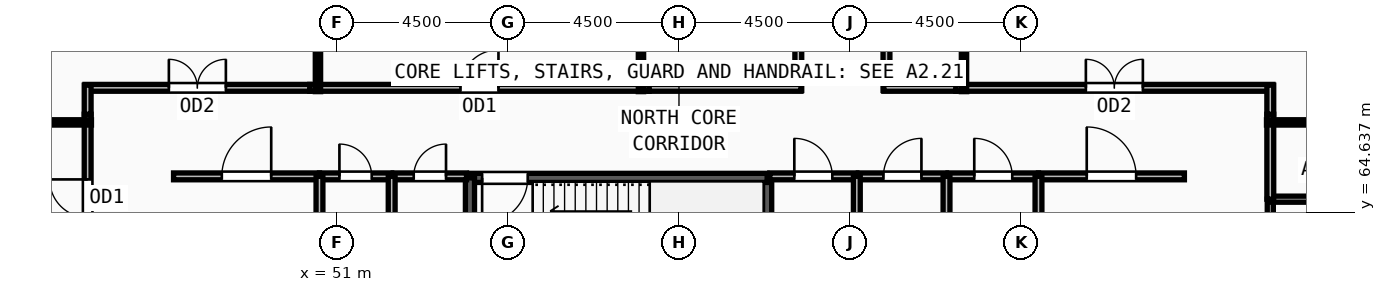
"""IFC4 building model, lengths in metres.
Left out: names, types, materials, properties, quantities, classifications, styles, units other than length and angle.
Written with IfcOpenShell. Run it as: python <this file> out.ifc"""

import sys

from ifc_helpers import new_model, si_unit, direction, frame, frame_2d, origin, place, context, subcontext, project, spatial, rectangle, extrude, source, transform, mapped, element, fill, save


model = new_model("IFC4")
c1 = context("Model", 3, precision=1e-05, world=origin(), true_north=direction((0.0, 1.0)))
c2 = subcontext(c1, "Body", "Model", "MODEL_VIEW")
j1 = project(units=[si_unit("LENGTHUNIT", "METRE"), si_unit("PLANEANGLEUNIT", "RADIAN")], contexts=[c1])
p1 = place(None, origin())
s1 = spatial("IfcSite", under=j1, at=p1, CompositionType="ELEMENT")
p2 = place(p1, origin())
s2 = spatial("IfcBuilding", under=s1, at=p2, CompositionType="ELEMENT")
p3 = place(p2, frame((0.0, 0.0, 247.5)))
s3 = spatial("IfcBuildingStorey", under=s2, at=p3, CompositionType="ELEMENT", Elevation=247.5)
p4 = place(p3, frame((62.32, 62.1, 0.0), z_axis=(0.0, 0.0, 1.0), x_axis=(0.0, 1.0, 0.0)))
e1 = element("IfcWall", 1, at=p4, inside=s3, PredefinedType="SOLIDWALL", context=c2, shape_type="SweptSolid", body=[
    extrude(rectangle(XDim=3.44, YDim=0.24, at=frame_2d((1.72, 0.0))), origin(), (0.0, 0.0, 1.0), 3.57),
])
p5 = place(p3, frame((62.32, 65.54, 0.0), z_axis=(0.0, 0.0, 1.0), x_axis=(-1.0, 0.0, 0.0)))
e2 = element("IfcWall", 2, at=p5, inside=s3, PredefinedType="SOLIDWALL", context=c2, shape_type="SweptSolid", body=[
    extrude(rectangle(XDim=7.82, YDim=0.24, at=frame_2d((3.91, 0.0))), origin(), (0.0, 0.0, 1.0), 3.57),
])
m1 = source(origin(), c2, "Body", "SweptSolid", [
    extrude(rectangle(XDim=1.2, YDim=2.2, at=frame_2d((0.6, 1.1))), frame((0.0, 0.13, 0.0), z_axis=(0.0, -1.0, 0.0), x_axis=(1.0, 0.0, 0.0)), (0.0, 0.0, 1.0), 0.26),
])
p6 = place(p5, frame((6.3, 0.0, 0.0)))
e3 = element("IfcOpeningElement", 3, at=p6, cuts=e2, PredefinedType="OPENING", context=c2, shape_type="MappedRepresentation", body=[
    mapped(m1, transform((0.0, 0.0, 0.0), x_axis=(1.0, 0.0, 0.0), y_axis=(0.0, 1.0, 0.0), z_axis=(0.0, 0.0, 1.0), scale=1.0)),
])
p7 = place(p3, frame((54.5, 65.54, 0.0), z_axis=(0.0, 0.0, 1.0), x_axis=(0.0, -1.0, 0.0)))
e4 = element("IfcWall", 4, at=p7, inside=s3, PredefinedType="SOLIDWALL", context=c2, shape_type="SweptSolid", body=[
    extrude(rectangle(XDim=3.44, YDim=0.24, at=frame_2d((1.72, 0.0))), origin(), (0.0, 0.0, 1.0), 3.57),
])
p8 = place(p3, frame((75.56, 62.24, 0.0), z_axis=(0.0, 0.0, 1.0), x_axis=(0.0, 1.0, 0.0)))
e5 = element("IfcWall", 5, at=p8, inside=s3, PredefinedType="PARTITIONING", context=c2, shape_type="SweptSolid", body=[
    extrude(rectangle(XDim=2.74, YDim=0.16, at=frame_2d((1.37, 0.0))), origin(), (0.0, 0.0, 1.0), 3.57),
])
m2 = source(origin(), c2, "Body", "SweptSolid", [
    extrude(rectangle(XDim=1.05, YDim=2.15, at=frame_2d((0.525, 1.075))), frame((0.0, 0.09, 0.0), z_axis=(0.0, -1.0, 0.0), x_axis=(1.0, 0.0, 0.0)), (0.0, 0.0, 1.0), 0.18),
])
p9 = place(p8, frame((0.845, 0.0, 0.0)))
e6 = element("IfcOpeningElement", 6, at=p9, cuts=e5, PredefinedType="OPENING", context=c2, shape_type="MappedRepresentation", body=[
    mapped(m2, transform((0.0, 0.0, 0.0), x_axis=(1.0, 0.0, 0.0), y_axis=(0.0, 1.0, 0.0), z_axis=(0.0, 0.0, 1.0), scale=1.0)),
])
p10 = place(p3, frame((50.54, 65.58, 0.0), z_axis=(0.0, 0.0, 1.0), x_axis=(1.0, 0.0, 0.0)))
e7 = element("IfcWall", 7, at=p10, inside=s3, PredefinedType="PARTITIONING", context=c2, shape_type="SweptSolid", body=[
    extrude(rectangle(XDim=1.9, YDim=0.18, at=frame_2d((0.95, 0.0))), origin(), (0.0, 0.0, 1.0), 3.57),
])
m3 = source(origin(), c2, "Body", "SweptSolid", [
    extrude(rectangle(XDim=0.85, YDim=2.1, at=frame_2d((0.425, 1.05))), frame((0.0, 0.1, 0.0), z_axis=(0.0, -1.0, 0.0), x_axis=(1.0, 0.0, 0.0)), (0.0, 0.0, 1.0), 0.2),
])
p11 = place(p10, frame((0.525, 0.0, 0.0)))
e8 = element("IfcOpeningElement", 8, at=p11, cuts=e7, PredefinedType="OPENING", context=c2, shape_type="MappedRepresentation", body=[
    mapped(m3, transform((0.0, 0.0, 0.0), x_axis=(1.0, 0.0, 0.0), y_axis=(0.0, 1.0, 0.0), z_axis=(0.0, 0.0, 1.0), scale=1.0)),
])
p12 = place(p3, frame((52.48, 65.58, 0.0), z_axis=(0.0, 0.0, 1.0), x_axis=(1.0, 0.0, 0.0)))
e9 = element("IfcWall", 9, at=p12, inside=s3, PredefinedType="PARTITIONING", context=c2, shape_type="SweptSolid", body=[
    extrude(rectangle(XDim=1.93, YDim=0.18, at=frame_2d((0.965, 0.0))), origin(), (0.0, 0.0, 1.0), 3.57),
])
p13 = place(p12, frame((0.54, 0.0, 0.0)))
e10 = element("IfcOpeningElement", 10, at=p13, cuts=e9, PredefinedType="OPENING", context=c2, shape_type="MappedRepresentation", body=[
    mapped(m3, transform((0.0, 0.0, 0.0), x_axis=(1.0, 0.0, 0.0), y_axis=(0.0, 1.0, 0.0), z_axis=(0.0, 0.0, 1.0), scale=1.0)),
])
p14 = place(p3, frame((62.39, 65.58, 0.0), z_axis=(0.0, 0.0, 1.0), x_axis=(1.0, 0.0, 0.0)))
e11 = element("IfcWall", 11, at=p14, inside=s3, PredefinedType="PARTITIONING", context=c2, shape_type="SweptSolid", body=[
    extrude(rectangle(XDim=2.29, YDim=0.18, at=frame_2d((1.145, 0.0))), origin(), (0.0, 0.0, 1.0), 3.57),
])
m4 = source(origin(), c2, "Body", "SweptSolid", [
    extrude(rectangle(XDim=1.0, YDim=2.2, at=frame_2d((0.5, 1.1))), frame((0.0, 0.1, 0.0), z_axis=(0.0, -1.0, 0.0), x_axis=(1.0, 0.0, 0.0)), (0.0, 0.0, 1.0), 0.2),
])
p15 = place(p14, frame((0.645, 0.0, 0.0)))
e12 = element("IfcOpeningElement", 12, at=p15, cuts=e11, PredefinedType="OPENING", context=c2, shape_type="MappedRepresentation", body=[
    mapped(m4, transform((0.0, 0.0, 0.0), x_axis=(1.0, 0.0, 0.0), y_axis=(0.0, 1.0, 0.0), z_axis=(0.0, 0.0, 1.0), scale=1.0)),
])
p16 = place(p3, frame((64.72, 65.58, 0.0), z_axis=(0.0, 0.0, 1.0), x_axis=(1.0, 0.0, 0.0)))
e13 = element("IfcWall", 13, at=p16, inside=s3, PredefinedType="PARTITIONING", context=c2, shape_type="SweptSolid", body=[
    extrude(rectangle(XDim=2.32, YDim=0.18, at=frame_2d((1.16, 0.0))), origin(), (0.0, 0.0, 1.0), 3.57),
])
p17 = place(p16, frame((0.66, 0.0, 0.0)))
e14 = element("IfcOpeningElement", 14, at=p17, cuts=e13, PredefinedType="OPENING", context=c2, shape_type="MappedRepresentation", body=[
    mapped(m4, transform((0.0, 0.0, 0.0), x_axis=(1.0, 0.0, 0.0), y_axis=(0.0, 1.0, 0.0), z_axis=(0.0, 0.0, 1.0), scale=1.0)),
])
p18 = place(p3, frame((67.08, 65.58, 0.0), z_axis=(0.0, 0.0, 1.0), x_axis=(1.0, 0.0, 0.0)))
e15 = element("IfcWall", 15, at=p18, inside=s3, PredefinedType="PARTITIONING", context=c2, shape_type="SweptSolid", body=[
    extrude(rectangle(XDim=2.38, YDim=0.18, at=frame_2d((1.19, 0.0))), origin(), (0.0, 0.0, 1.0), 3.57),
])
p19 = place(p18, frame((0.69, 0.0, 0.0)))
e16 = element("IfcOpeningElement", 16, at=p19, cuts=e15, PredefinedType="OPENING", context=c2, shape_type="MappedRepresentation", body=[
    mapped(m4, transform((0.0, 0.0, 0.0), x_axis=(1.0, 0.0, 0.0), y_axis=(0.0, 1.0, 0.0), z_axis=(0.0, 0.0, 1.0), scale=1.0)),
])
p20 = place(p3, frame((46.7, 65.58, 0.0), z_axis=(0.0, 0.0, 1.0), x_axis=(1.0, 0.0, 0.0)))
e17 = element("IfcWall", 17, at=p20, inside=s3, PredefinedType="PARTITIONING", context=c2, shape_type="SweptSolid", body=[
    extrude(rectangle(XDim=3.84, YDim=0.18, at=frame_2d((1.92, 0.0))), origin(), (0.0, 0.0, 1.0), 3.57),
])
m5 = source(origin(), c2, "Body", "SweptSolid", [
    extrude(rectangle(XDim=1.3, YDim=2.2, at=frame_2d((0.65, 1.1))), frame((0.0, 0.1, 0.0), z_axis=(0.0, -1.0, 0.0), x_axis=(1.0, 0.0, 0.0)), (0.0, 0.0, 1.0), 0.2),
])
p21 = place(p20, frame((1.27, 0.0, 0.0)))
e18 = element("IfcOpeningElement", 18, at=p21, cuts=e17, PredefinedType="OPENING", context=c2, shape_type="MappedRepresentation", body=[
    mapped(m5, transform((0.0, 0.0, 0.0), x_axis=(1.0, 0.0, 0.0), y_axis=(0.0, 1.0, 0.0), z_axis=(0.0, 0.0, 1.0), scale=1.0)),
])
p22 = place(p3, frame((69.46, 65.58, 0.0), z_axis=(0.0, 0.0, 1.0), x_axis=(1.0, 0.0, 0.0)))
e19 = element("IfcWall", 19, at=p22, inside=s3, PredefinedType="PARTITIONING", context=c2, shape_type="SweptSolid", body=[
    extrude(rectangle(XDim=3.84, YDim=0.18, at=frame_2d((1.92, 0.0))), origin(), (0.0, 0.0, 1.0), 3.57),
])
p23 = place(p22, frame((1.27, 0.0, 0.0)))
e20 = element("IfcOpeningElement", 20, at=p23, cuts=e19, PredefinedType="OPENING", context=c2, shape_type="MappedRepresentation", body=[
    mapped(m5, transform((0.0, 0.0, 0.0), x_axis=(1.0, 0.0, 0.0), y_axis=(0.0, 1.0, 0.0), z_axis=(0.0, 0.0, 1.0), scale=1.0)),
])
p24 = place(p3, frame((67.285, 67.91, 0.0), z_axis=(0.0, 0.0, 1.0), x_axis=(1.0, 0.0, 0.0)))
e21 = element("IfcWall", 21, at=p24, inside=s3, PredefinedType="PARTITIONING", context=c2, shape_type="SweptSolid", body=[
    extrude(rectangle(XDim=8.345, YDim=0.18, at=frame_2d((4.172, 0.0))), origin(), (0.0, 0.0, 1.0), 3.205),
])
m6 = source(origin(), c2, "Body", "SweptSolid", [
    extrude(rectangle(XDim=1.5, YDim=2.2, at=frame_2d((0.75, 1.1))), frame((0.0, 0.1, 0.0), z_axis=(0.0, -1.0, 0.0), x_axis=(1.0, 0.0, 0.0)), (0.0, 0.0, 1.0), 0.2),
])
p25 = place(p24, frame((3.422, 0.0, 0.0)))
e22 = element("IfcOpeningElement", 22, at=p25, cuts=e21, PredefinedType="OPENING", context=c2, shape_type="MappedRepresentation", body=[
    mapped(m6, transform((0.0, 0.0, 0.0), x_axis=(1.0, 0.0, 0.0), y_axis=(0.0, 1.0, 0.0), z_axis=(0.0, 0.0, 1.0), scale=1.0)),
])
p26 = place(p3, frame((65.46, 77.681, 0.0), z_axis=(0.0, 0.0, 1.0), x_axis=(0.0, -1.0, 0.0)))
e23 = element("IfcWall", 23, at=p26, inside=s3, PredefinedType="PARTITIONING", context=c2, shape_type="SweptSolid", body=[
    extrude(rectangle(XDim=9.841, YDim=0.18, at=frame_2d((4.92, 0.0))), origin(), (0.0, 0.0, 1.0), 3.57),
])
p27 = place(p26, frame((4.42, 0.0, 0.0)))
e24 = element("IfcOpeningElement", 24, at=p27, cuts=e23, PredefinedType="OPENING", context=c2, shape_type="MappedRepresentation", body=[
    mapped(m4, transform((0.0, 0.0, 0.0), x_axis=(1.0, 0.0, 0.0), y_axis=(0.0, 1.0, 0.0), z_axis=(0.0, 0.0, 1.0), scale=1.0)),
])
p28 = place(p3, frame((63.14, 67.84, 0.0), z_axis=(0.0, 0.0, 1.0), x_axis=(0.0, 1.0, 0.0)))
e25 = element("IfcWall", 25, at=p28, inside=s3, PredefinedType="PARTITIONING", context=c2, shape_type="SweptSolid", body=[
    extrude(rectangle(XDim=10.019, YDim=0.18, at=frame_2d((5.009, 0.0))), origin(), (0.0, 0.0, 1.0), 3.57),
])
p29 = place(p28, frame((4.509, 0.0, 0.0)))
e26 = element("IfcOpeningElement", 26, at=p29, cuts=e25, PredefinedType="OPENING", context=c2, shape_type="MappedRepresentation", body=[
    mapped(m4, transform((0.0, 0.0, 0.0), x_axis=(1.0, 0.0, 0.0), y_axis=(0.0, 1.0, 0.0), z_axis=(0.0, 0.0, 1.0), scale=1.0)),
])
p30 = place(p3, frame((50.285, 67.91, 0.0), z_axis=(0.0, 0.0, 1.0), x_axis=(1.0, 0.0, 0.0)))
e27 = element("IfcWall", 27, at=p30, inside=s3, PredefinedType="PARTITIONING", context=c2, shape_type="SweptSolid", body=[
    extrude(rectangle(XDim=8.93, YDim=0.18, at=frame_2d((4.465, 0.0))), origin(), (0.0, 0.0, 1.0), 3.205),
])
p31 = place(p30, frame((3.965, 0.0, 0.0)))
e28 = element("IfcOpeningElement", 28, at=p31, cuts=e27, PredefinedType="OPENING", context=c2, shape_type="MappedRepresentation", body=[
    mapped(m4, transform((0.0, 0.0, 0.0), x_axis=(1.0, 0.0, 0.0), y_axis=(0.0, 1.0, 0.0), z_axis=(0.0, 0.0, 1.0), scale=1.0)),
])
p32 = place(p3, frame((44.37, 67.91, 0.0), z_axis=(0.0, 0.0, 1.0), x_axis=(1.0, 0.0, 0.0)))
e29 = element("IfcWall", 29, at=p32, inside=s3, PredefinedType="PARTITIONING", context=c2, shape_type="SweptSolid", body=[
    extrude(rectangle(XDim=5.915, YDim=0.18, at=frame_2d((2.958, 0.0))), origin(), (0.0, 0.0, 1.0), 3.205),
])
p33 = place(p32, frame((2.207, 0.0, 0.0)))
e30 = element("IfcOpeningElement", 30, at=p33, cuts=e29, PredefinedType="OPENING", context=c2, shape_type="MappedRepresentation", body=[
    mapped(m6, transform((0.0, 0.0, 0.0), x_axis=(1.0, 0.0, 0.0), y_axis=(0.0, 1.0, 0.0), z_axis=(0.0, 0.0, 1.0), scale=1.0)),
])
p34 = place(p3, frame((44.44, 62.785, 0.0), z_axis=(0.0, 0.0, 1.0), x_axis=(0.0, 1.0, 0.0)))
e31 = element("IfcWall", 31, at=p34, inside=s3, PredefinedType="PARTITIONING", context=c2, shape_type="SweptSolid", body=[
    extrude(rectangle(XDim=4.43, YDim=0.18, at=frame_2d((2.215, 0.0))), origin(), (0.0, 0.0, 1.0), 3.57),
])
p35 = place(p34, frame((1.715, 0.0, 0.0)))
e32 = element("IfcOpeningElement", 32, at=p35, cuts=e31, PredefinedType="OPENING", context=c2, shape_type="MappedRepresentation", body=[
    mapped(m4, transform((0.0, 0.0, 0.0), x_axis=(1.0, 0.0, 0.0), y_axis=(0.0, 1.0, 0.0), z_axis=(0.0, 0.0, 1.0), scale=1.0)),
])
p36 = place(p3, frame((75.56, 64.98, 0.0), z_axis=(0.0, 0.0, 1.0), x_axis=(1.0, 0.0, 0.0)))
e33 = element("IfcWall", 33, at=p36, inside=s3, PredefinedType="PARTITIONING", context=c2, shape_type="SweptSolid", body=[
    extrude(rectangle(XDim=4.46, YDim=0.16, at=frame_2d((2.23, 0.0))), origin(), (0.0, 0.0, 1.0), 3.57),
])
p37 = place(p3, frame((50.54, 61.95, 0.0), z_axis=(0.0, 0.0, 1.0), x_axis=(0.0, 1.0, 0.0)))
e34 = element("IfcWall", 34, at=p37, inside=s3, PredefinedType="PARTITIONING", context=c2, shape_type="SweptSolid", body=[
    extrude(rectangle(XDim=3.63, YDim=0.18, at=frame_2d((1.815, 0.0))), origin(), (0.0, 0.0, 1.0), 3.57),
])
for number, where, z_axis, x_axis in (
    (35, (52.44, 61.825, 0.0), (0.0, 0.0, 1.0), (0.0, 1.0, 0.0)),
    (36, (64.68, 61.825, 0.0), (0.0, 0.0, 1.0), (0.0, 1.0, 0.0)),
    (37, (67.04, 61.825, 0.0), (0.0, 0.0, 1.0), (0.0, 1.0, 0.0)),
):
    element("IfcWall", number, at=place(p3, frame(where, z_axis=z_axis, x_axis=x_axis)), inside=s3, PredefinedType="PARTITIONING", context=c2, shape_type="SweptSolid", body=[
        extrude(rectangle(XDim=3.755, YDim=0.18, at=frame_2d((1.877, 0.0))), origin(), (0.0, 0.0, 1.0), 3.57),
    ])
p38 = place(p3, frame((69.46, 61.95, 0.0), z_axis=(0.0, 0.0, 1.0), x_axis=(0.0, 1.0, 0.0)))
e38 = element("IfcWall", 38, at=p38, inside=s3, PredefinedType="PARTITIONING", context=c2, shape_type="SweptSolid", body=[
    extrude(rectangle(XDim=3.63, YDim=0.18, at=frame_2d((1.815, 0.0))), origin(), (0.0, 0.0, 1.0), 3.57),
])
p39 = place(p3, frame((75.56, 67.215, 0.0), z_axis=(0.0, 0.0, 1.0), x_axis=(0.0, -1.0, 0.0)))
e39 = element("IfcWall", 39, at=p39, inside=s3, PredefinedType="PARTITIONING", context=c2, shape_type="SweptSolid", body=[
    extrude(rectangle(XDim=2.235, YDim=0.18, at=frame_2d((1.118, 0.0))), origin(), (0.0, 0.0, 1.0), 3.57),
])
p40 = place(p3, frame((75.56, 67.98, 0.0), z_axis=(0.0, 0.0, 1.0), x_axis=(0.0, -1.0, 0.0)))
e40 = element("IfcWall", 40, at=p40, inside=s3, PredefinedType="PARTITIONING", context=c2, shape_type="SweptSolid", body=[
    extrude(rectangle(XDim=0.765, YDim=0.18, at=frame_2d((0.382, 0.0))), origin(), (0.0, 0.0, 1.0), 3.57),
])
p41 = place(p3, frame((65.39, 67.91, 0.0), z_axis=(0.0, 0.0, 1.0), x_axis=(1.0, 0.0, 0.0)))
e41 = element("IfcWall", 41, at=p41, inside=s3, PredefinedType="PARTITIONING", context=c2, shape_type="SweptSolid", body=[
    extrude(rectangle(XDim=1.895, YDim=0.18, at=frame_2d((0.948, 0.0))), origin(), (0.0, 0.0, 1.0), 3.57),
])
p42 = place(p3, frame((59.215, 67.91, 0.0), z_axis=(0.0, 0.0, 1.0), x_axis=(1.0, 0.0, 0.0)))
e42 = element("IfcWall", 42, at=p42, inside=s3, PredefinedType="PARTITIONING", context=c2, shape_type="SweptSolid", body=[
    extrude(rectangle(XDim=3.995, YDim=0.18, at=frame_2d((1.998, 0.0))), origin(), (0.0, 0.0, 1.0), 3.57),
])
p43 = place(p3, frame((44.44, 67.215, 0.0), z_axis=(0.0, 0.0, 1.0), x_axis=(0.0, 1.0, 0.0)))
e43 = element("IfcWall", 43, at=p43, inside=s3, PredefinedType="PARTITIONING", context=c2, shape_type="SweptSolid", body=[
    extrude(rectangle(XDim=0.765, YDim=0.18, at=frame_2d((0.382, 0.0))), origin(), (0.0, 0.0, 1.0), 3.57),
])
for number, where, z_axis, x_axis in (
    (44, (44.54, 67.0, 0.0), (0.0, 0.0, 1.0), (-1.0, 0.0, 0.0)),
    (45, (75.46, 67.0, 0.0), (0.0, 0.0, 1.0), (1.0, 0.0, 0.0)),
):
    element("IfcWall", number, at=place(p3, frame(where, z_axis=z_axis, x_axis=x_axis)), inside=s3, PredefinedType="PARTITIONING", context=c2, shape_type="SweptSolid", body=[
        extrude(rectangle(XDim=16.888, YDim=0.14, at=frame_2d((8.444, 0.0))), origin(), (0.0, 0.0, 1.0), 3.57),
    ])
p44 = place(p3, frame((50.5, 67.81, 0.0), z_axis=(0.0, 0.0, 1.0), x_axis=(0.0, 1.0, 0.0)))
e46 = element("IfcWall", 46, at=p44, inside=s3, PredefinedType="PARTITIONING", context=c2, shape_type="SweptSolid", body=[
    extrude(rectangle(XDim=9.424, YDim=0.14, at=frame_2d((4.712, 0.0))), origin(), (0.0, 0.0, 1.0), 3.57),
])
p45 = place(p3, frame((59.0, 67.81, 0.0), z_axis=(0.0, 0.0, 1.0), x_axis=(0.0, 1.0, 0.0)))
e47 = element("IfcWall", 47, at=p45, inside=s3, PredefinedType="PARTITIONING", context=c2, shape_type="SweptSolid", body=[
    extrude(rectangle(XDim=9.969, YDim=0.14, at=frame_2d((4.984, 0.0))), origin(), (0.0, 0.0, 1.0), 3.57),
])
p46 = place(p3, frame((67.5, 67.81, 0.0), z_axis=(0.0, 0.0, 1.0), x_axis=(0.0, 1.0, 0.0)))
e48 = element("IfcWall", 48, at=p46, inside=s3, PredefinedType="PARTITIONING", context=c2, shape_type="SweptSolid", body=[
    extrude(rectangle(XDim=9.805, YDim=0.14, at=frame_2d((4.902, 0.0))), origin(), (0.0, 0.0, 1.0), 3.57),
])
m7 = source(origin(), c2, "Body", "SweptSolid", [
    extrude(rectangle(XDim=1.2, YDim=2.2, at=frame_2d((0.6, 1.1))), frame((0.0, 0.025, 0.0), z_axis=(0.0, -1.0, 0.0), x_axis=(1.0, 0.0, 0.0)), (0.0, 0.0, 1.0), 0.05),
])
p47 = place(p6, origin())
e49 = element("IfcDoor", 49, at=p47, inside=s3, OperationType="SINGLE_SWING_RIGHT", PredefinedType="DOOR", context=c2, shape_type="MappedRepresentation", body=[
    mapped(m7, transform((0.0, 0.0, 0.0), x_axis=(1.0, 0.0, 0.0), y_axis=(0.0, 1.0, 0.0), z_axis=(0.0, 0.0, 1.0), scale=1.0)),
])
fill(e3, e49)
m8 = source(origin(), c2, "Body", "SweptSolid", [
    extrude(rectangle(XDim=0.85, YDim=2.1, at=frame_2d((0.425, 1.05))), frame((0.0, 0.025, 0.0), z_axis=(0.0, -1.0, 0.0), x_axis=(1.0, 0.0, 0.0)), (0.0, 0.0, 1.0), 0.05),
])
p48 = place(p11, origin())
e50 = element("IfcDoor", 50, at=p48, inside=s3, OperationType="SINGLE_SWING_LEFT", PredefinedType="DOOR", context=c2, shape_type="MappedRepresentation", body=[
    mapped(m8, transform((0.0, 0.0, 0.0), x_axis=(1.0, 0.0, 0.0), y_axis=(0.0, 1.0, 0.0), z_axis=(0.0, 0.0, 1.0), scale=1.0)),
])
fill(e8, e50)
p49 = place(p13, origin())
e51 = element("IfcDoor", 51, at=p49, inside=s3, OperationType="SINGLE_SWING_RIGHT", PredefinedType="DOOR", context=c2, shape_type="MappedRepresentation", body=[
    mapped(m8, transform((0.0, 0.0, 0.0), x_axis=(1.0, 0.0, 0.0), y_axis=(0.0, 1.0, 0.0), z_axis=(0.0, 0.0, 1.0), scale=1.0)),
])
fill(e10, e51)
m9 = source(origin(), c2, "Body", "SweptSolid", [
    extrude(rectangle(XDim=1.0, YDim=2.2, at=frame_2d((0.5, 1.1))), frame((0.0, 0.025, 0.0), z_axis=(0.0, -1.0, 0.0), x_axis=(1.0, 0.0, 0.0)), (0.0, 0.0, 1.0), 0.05),
])
p50 = place(p15, origin())
e52 = element("IfcDoor", 52, at=p50, inside=s3, OperationType="SINGLE_SWING_LEFT", PredefinedType="DOOR", context=c2, shape_type="MappedRepresentation", body=[
    mapped(m9, transform((0.0, 0.0, 0.0), x_axis=(1.0, 0.0, 0.0), y_axis=(0.0, 1.0, 0.0), z_axis=(0.0, 0.0, 1.0), scale=1.0)),
])
fill(e12, e52)
p51 = place(p17, origin())
e53 = element("IfcDoor", 53, at=p51, inside=s3, OperationType="SINGLE_SWING_RIGHT", PredefinedType="DOOR", context=c2, shape_type="MappedRepresentation", body=[
    mapped(m9, transform((0.0, 0.0, 0.0), x_axis=(1.0, 0.0, 0.0), y_axis=(0.0, 1.0, 0.0), z_axis=(0.0, 0.0, 1.0), scale=1.0)),
])
fill(e14, e53)
p52 = place(p19, origin())
e54 = element("IfcDoor", 54, at=p52, inside=s3, OperationType="SINGLE_SWING_LEFT", PredefinedType="DOOR", context=c2, shape_type="MappedRepresentation", body=[
    mapped(m9, transform((0.0, 0.0, 0.0), x_axis=(1.0, 0.0, 0.0), y_axis=(0.0, 1.0, 0.0), z_axis=(0.0, 0.0, 1.0), scale=1.0)),
])
fill(e16, e54)
m10 = source(origin(), c2, "Body", "SweptSolid", [
    extrude(rectangle(XDim=1.3, YDim=2.2, at=frame_2d((0.65, 1.1))), frame((0.0, 0.025, 0.0), z_axis=(0.0, -1.0, 0.0), x_axis=(1.0, 0.0, 0.0)), (0.0, 0.0, 1.0), 0.05),
])
p53 = place(p21, origin())
e55 = element("IfcDoor", 55, at=p53, inside=s3, OperationType="SINGLE_SWING_RIGHT", PredefinedType="DOOR", context=c2, shape_type="MappedRepresentation", body=[
    mapped(m10, transform((0.0, 0.0, 0.0), x_axis=(1.0, 0.0, 0.0), y_axis=(0.0, 1.0, 0.0), z_axis=(0.0, 0.0, 1.0), scale=1.0)),
])
fill(e18, e55)
p54 = place(p23, origin())
e56 = element("IfcDoor", 56, at=p54, inside=s3, OperationType="SINGLE_SWING_LEFT", PredefinedType="DOOR", context=c2, shape_type="MappedRepresentation", body=[
    mapped(m10, transform((0.0, 0.0, 0.0), x_axis=(1.0, 0.0, 0.0), y_axis=(0.0, 1.0, 0.0), z_axis=(0.0, 0.0, 1.0), scale=1.0)),
])
fill(e20, e56)
m11 = source(origin(), c2, "Body", "SweptSolid", [
    extrude(rectangle(XDim=1.5, YDim=2.2, at=frame_2d((0.75, 1.1))), frame((0.0, 0.025, 0.0), z_axis=(0.0, -1.0, 0.0), x_axis=(1.0, 0.0, 0.0)), (0.0, 0.0, 1.0), 0.05),
])
p55 = place(p25, origin())
e57 = element("IfcDoor", 57, at=p55, inside=s3, OperationType="DOUBLE_DOOR_SINGLE_SWING", PredefinedType="DOOR", context=c2, shape_type="MappedRepresentation", body=[
    mapped(m11, transform((0.0, 0.0, 0.0), x_axis=(1.0, 0.0, 0.0), y_axis=(0.0, 1.0, 0.0), z_axis=(0.0, 0.0, 1.0), scale=1.0)),
])
fill(e22, e57)
p56 = place(p31, origin())
e58 = element("IfcDoor", 58, at=p56, inside=s3, OperationType="SINGLE_SWING_RIGHT", PredefinedType="DOOR", context=c2, shape_type="MappedRepresentation", body=[
    mapped(m9, transform((0.0, 0.0, 0.0), x_axis=(1.0, 0.0, 0.0), y_axis=(0.0, 1.0, 0.0), z_axis=(0.0, 0.0, 1.0), scale=1.0)),
])
fill(e28, e58)
p57 = place(p33, origin())
e59 = element("IfcDoor", 59, at=p57, inside=s3, OperationType="DOUBLE_DOOR_SINGLE_SWING", PredefinedType="DOOR", context=c2, shape_type="MappedRepresentation", body=[
    mapped(m11, transform((0.0, 0.0, 0.0), x_axis=(1.0, 0.0, 0.0), y_axis=(0.0, 1.0, 0.0), z_axis=(0.0, 0.0, 1.0), scale=1.0)),
])
fill(e30, e59)
p58 = place(p35, origin())
e60 = element("IfcDoor", 60, at=p58, inside=s3, OperationType="SINGLE_SWING_RIGHT", PredefinedType="DOOR", context=c2, shape_type="MappedRepresentation", body=[
    mapped(m9, transform((0.0, 0.0, 0.0), x_axis=(1.0, 0.0, 0.0), y_axis=(0.0, 1.0, 0.0), z_axis=(0.0, 0.0, 1.0), scale=1.0)),
])
fill(e32, e60)
save(model, sys.argv[1])
